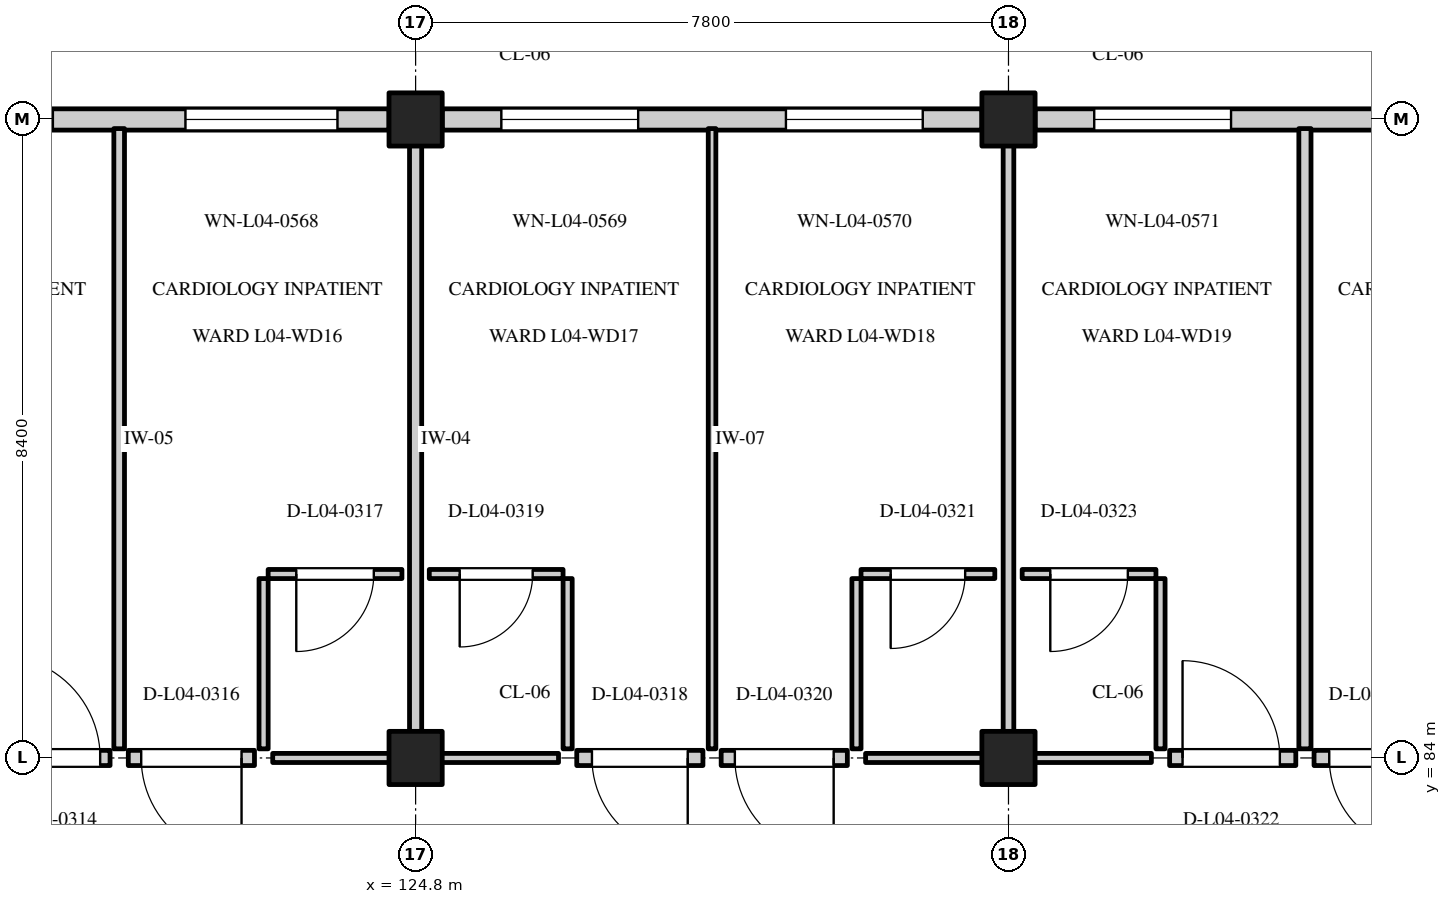
"""IFC4 building model, lengths in metres.
Left out: names, types, materials, properties, quantities, classifications, styles, units other than length and angle.
Written with IfcOpenShell. Run it as: python <this file> out.ifc"""

import sys

from ifc_helpers import new_model, si_unit, direction, frame, frame_2d, origin, origin_2d, place, context, subcontext, project, spatial, rectangle, extrude, element, fill, save


model = new_model("IFC4")
c1 = context("Model", 3, precision=1e-05, world=origin(), true_north=direction((0.0, 1.0)))
c2 = subcontext(c1, "Body", "Model", "MODEL_VIEW")
j1 = project(units=[si_unit("LENGTHUNIT", "METRE"), si_unit("PLANEANGLEUNIT", "RADIAN")], contexts=[c1])
p1 = place(None, origin())
s1 = spatial("IfcSite", under=j1, at=p1, CompositionType="ELEMENT")
p2 = place(p1, origin())
s2 = spatial("IfcBuilding", under=s1, at=p2, CompositionType="ELEMENT")
p3 = place(p2, frame((0.0, 0.0, 18.0)))
s3 = spatial("IfcBuildingStorey", under=s2, at=p3, CompositionType="ELEMENT", Elevation=18.0)
for number, where, z_axis, x_axis in (
    (1, (124.8, 84.0, 0.0), (0.0, 0.0, 1.0), (1.0, 0.0, 0.0)),
    (2, (124.8, 92.4, 0.0), (0.0, 0.0, 1.0), (1.0, 0.0, 0.0)),
    (3, (132.6, 84.0, 0.0), (0.0, 0.0, 1.0), (1.0, 0.0, 0.0)),
    (4, (132.6, 92.4, 0.0), (0.0, 0.0, 1.0), (1.0, 0.0, 0.0)),
):
    element("IfcColumn", number, at=place(p3, frame(where, z_axis=z_axis, x_axis=x_axis)), inside=s3, PredefinedType="COLUMN", context=c2, shape_type="SweptSolid", body=[
        extrude(rectangle(XDim=0.7, YDim=0.7, at=origin_2d()), origin(), (0.0, 0.0, 1.0), 4.2),
    ])
p4 = place(p3, frame((117.35, 92.4, 0.0), z_axis=(0.0, 0.0, 1.0), x_axis=(1.0, 0.0, 0.0)))
e5 = element("IfcWall", 5, at=p4, inside=s3, PredefinedType="STANDARD", context=c2, shape_type="SweptSolid", body=[
    extrude(rectangle(XDim=7.1, YDim=0.28, at=frame_2d((3.55, 0.0))), origin(), (0.0, 0.0, 1.0), 3.335),
])
p5 = place(p4, frame((0.678, 0.0, 0.8)))
e6 = element("IfcOpeningElement", 6, at=p5, cuts=e5, PredefinedType="OPENING", context=c2, shape_type="SweptSolid", body=[
    extrude(rectangle(XDim=2.0, YDim=1.45, at=frame_2d((1.0, 0.725))), frame((0.0, 0.152, 0.0), z_axis=(0.0, -1.0, 0.0), x_axis=(1.0, 0.0, 0.0)), (0.0, 0.0, 1.0), 0.304),
])
p6 = place(p4, frame((4.422, 0.0, 0.8)))
e7 = element("IfcOpeningElement", 7, at=p6, cuts=e5, PredefinedType="OPENING", context=c2, shape_type="SweptSolid", body=[
    extrude(rectangle(XDim=2.0, YDim=1.45, at=frame_2d((1.0, 0.725))), frame((0.0, 0.152, 0.0), z_axis=(0.0, -1.0, 0.0), x_axis=(1.0, 0.0, 0.0)), (0.0, 0.0, 1.0), 0.304),
])
p7 = place(p3, frame((125.15, 92.4, 0.0), z_axis=(0.0, 0.0, 1.0), x_axis=(1.0, 0.0, 0.0)))
e8 = element("IfcWall", 8, at=p7, inside=s3, PredefinedType="STANDARD", context=c2, shape_type="SweptSolid", body=[
    extrude(rectangle(XDim=7.1, YDim=0.28, at=frame_2d((3.55, 0.0))), origin(), (0.0, 0.0, 1.0), 3.335),
])
p8 = place(p7, frame((0.778, 0.0, 0.8)))
e9 = element("IfcOpeningElement", 9, at=p8, cuts=e8, PredefinedType="OPENING", context=c2, shape_type="SweptSolid", body=[
    extrude(rectangle(XDim=1.8, YDim=1.75, at=frame_2d((0.9, 0.875))), frame((0.0, 0.152, 0.0), z_axis=(0.0, -1.0, 0.0), x_axis=(1.0, 0.0, 0.0)), (0.0, 0.0, 1.0), 0.304),
])
p9 = place(p7, frame((4.522, 0.0, 0.8)))
e10 = element("IfcOpeningElement", 10, at=p9, cuts=e8, PredefinedType="OPENING", context=c2, shape_type="SweptSolid", body=[
    extrude(rectangle(XDim=1.8, YDim=1.75, at=frame_2d((0.9, 0.875))), frame((0.0, 0.152, 0.0), z_axis=(0.0, -1.0, 0.0), x_axis=(1.0, 0.0, 0.0)), (0.0, 0.0, 1.0), 0.304),
])
p10 = place(p3, frame((132.95, 92.4, 0.0), z_axis=(0.0, 0.0, 1.0), x_axis=(1.0, 0.0, 0.0)))
e11 = element("IfcWall", 11, at=p10, inside=s3, PredefinedType="STANDARD", context=c2, shape_type="SweptSolid", body=[
    extrude(rectangle(XDim=7.1, YDim=0.28, at=frame_2d((3.55, 0.0))), origin(), (0.0, 0.0, 1.0), 3.335),
])
p11 = place(p10, frame((0.778, 0.0, 0.8)))
e12 = element("IfcOpeningElement", 12, at=p11, cuts=e11, PredefinedType="OPENING", context=c2, shape_type="SweptSolid", body=[
    extrude(rectangle(XDim=1.8, YDim=1.65, at=frame_2d((0.9, 0.825))), frame((0.0, 0.152, 0.0), z_axis=(0.0, -1.0, 0.0), x_axis=(1.0, 0.0, 0.0)), (0.0, 0.0, 1.0), 0.304),
])
p12 = place(p10, frame((4.522, 0.0, 0.8)))
e13 = element("IfcOpeningElement", 13, at=p12, cuts=e11, PredefinedType="OPENING", context=c2, shape_type="SweptSolid", body=[
    extrude(rectangle(XDim=1.8, YDim=1.65, at=frame_2d((0.9, 0.825))), frame((0.0, 0.152, 0.0), z_axis=(0.0, -1.0, 0.0), x_axis=(1.0, 0.0, 0.0)), (0.0, 0.0, 1.0), 0.304),
])
p13 = place(p3, frame((120.9, 84.12, 0.0), z_axis=(0.0, 0.0, 1.0), x_axis=(0.0, 1.0, 0.0)))
e14 = element("IfcWall", 14, at=p13, inside=s3, PredefinedType="PARTITIONING", context=c2, shape_type="SweptSolid", body=[
    extrude(rectangle(XDim=8.16, YDim=0.14, at=frame_2d((4.08, 0.0))), origin(), (0.0, 0.0, 1.0), 3.865),
])
p14 = place(p3, frame((119.12, 84.0, 0.0), z_axis=(0.0, 0.0, 1.0), x_axis=(1.0, 0.0, 0.0)))
e15 = element("IfcWall", 15, at=p14, inside=s3, PredefinedType="STANDARD", context=c2, shape_type="SweptSolid", body=[
    extrude(rectangle(XDim=1.66, YDim=0.2, at=frame_2d((0.83, 0.0))), origin(), (0.0, 0.0, 1.0), 3.235),
])
p15 = place(p14, frame((0.18, 0.0, 0.0)))
e16 = element("IfcOpeningElement", 16, at=p15, cuts=e15, PredefinedType="OPENING", context=c2, shape_type="SweptSolid", body=[
    extrude(rectangle(XDim=1.35, YDim=2.15, at=frame_2d((0.675, 1.075))), frame((0.0, 0.112, 0.0), z_axis=(0.0, -1.0, 0.0), x_axis=(1.0, 0.0, 0.0)), (0.0, 0.0, 1.0), 0.224),
])
p16 = place(p3, frame((124.8, 84.12, 0.0), z_axis=(0.0, 0.0, 1.0), x_axis=(0.0, 1.0, 0.0)))
e17 = element("IfcWall", 17, at=p16, inside=s3, PredefinedType="PARTITIONING", context=c2, shape_type="SweptSolid", body=[
    extrude(rectangle(XDim=8.16, YDim=0.16, at=frame_2d((4.08, 0.0))), origin(), (0.0, 0.0, 1.0), 3.865),
])
p17 = place(p3, frame((121.02, 84.0, 0.0), z_axis=(0.0, 0.0, 1.0), x_axis=(1.0, 0.0, 0.0)))
e18 = element("IfcWall", 18, at=p17, inside=s3, PredefinedType="STANDARD", context=c2, shape_type="SweptSolid", body=[
    extrude(rectangle(XDim=1.66, YDim=0.2, at=frame_2d((0.83, 0.0))), origin(), (0.0, 0.0, 1.0), 3.235),
])
p18 = place(p17, frame((0.17, 0.0, 0.0)))
e19 = element("IfcOpeningElement", 19, at=p18, cuts=e18, PredefinedType="OPENING", context=c2, shape_type="SweptSolid", body=[
    extrude(rectangle(XDim=1.32, YDim=2.2, at=frame_2d((0.66, 1.1))), frame((0.0, 0.112, 0.0), z_axis=(0.0, -1.0, 0.0), x_axis=(1.0, 0.0, 0.0)), (0.0, 0.0, 1.0), 0.224),
])
p19 = place(p3, frame((122.92, 84.0, 0.0), z_axis=(0.0, 0.0, 1.0), x_axis=(1.0, 0.0, 0.0)))
e20 = element("IfcWall", 20, at=p19, inside=s3, PredefinedType="PARTITIONING", context=c2, shape_type="SweptSolid", body=[
    extrude(rectangle(XDim=1.76, YDim=0.12, at=frame_2d((0.88, 0.0))), origin(), (0.0, 0.0, 1.0), 3.235),
])
p20 = place(p3, frame((122.8, 84.12, 0.0), z_axis=(0.0, 0.0, 1.0), x_axis=(0.0, 1.0, 0.0)))
e21 = element("IfcWall", 21, at=p20, inside=s3, PredefinedType="PARTITIONING", context=c2, shape_type="SweptSolid", body=[
    extrude(rectangle(XDim=2.24, YDim=0.12, at=frame_2d((1.12, 0.0))), origin(), (0.0, 0.0, 1.0), 3.865),
])
p21 = place(p3, frame((122.86, 86.42, 0.0), z_axis=(0.0, 0.0, 1.0), x_axis=(1.0, 0.0, 0.0)))
e22 = element("IfcWall", 22, at=p21, inside=s3, PredefinedType="PARTITIONING", context=c2, shape_type="SweptSolid", body=[
    extrude(rectangle(XDim=1.76, YDim=0.12, at=frame_2d((0.88, 0.0))), origin(), (0.0, 0.0, 1.0), 3.865),
])
p22 = place(p21, frame((0.37, 0.0, 0.0)))
e23 = element("IfcOpeningElement", 23, at=p22, cuts=e22, PredefinedType="OPENING", context=c2, shape_type="SweptSolid", body=[
    extrude(rectangle(XDim=1.02, YDim=2.15, at=frame_2d((0.51, 1.075))), frame((0.0, 0.072, 0.0), z_axis=(0.0, -1.0, 0.0), x_axis=(1.0, 0.0, 0.0)), (0.0, 0.0, 1.0), 0.144),
])
p23 = place(p3, frame((128.7, 84.12, 0.0), z_axis=(0.0, 0.0, 1.0), x_axis=(0.0, 1.0, 0.0)))
e24 = element("IfcWall", 24, at=p23, inside=s3, PredefinedType="PARTITIONING", context=c2, shape_type="SweptSolid", body=[
    extrude(rectangle(XDim=8.16, YDim=0.1, at=frame_2d((4.08, 0.0))), origin(), (0.0, 0.0, 1.0), 3.865),
])
p24 = place(p3, frame((126.92, 84.0, 0.0), z_axis=(0.0, 0.0, 1.0), x_axis=(1.0, 0.0, 0.0)))
e25 = element("IfcWall", 25, at=p24, inside=s3, PredefinedType="STANDARD", context=c2, shape_type="SweptSolid", body=[
    extrude(rectangle(XDim=1.66, YDim=0.2, at=frame_2d((0.83, 0.0))), origin(), (0.0, 0.0, 1.0), 3.235),
])
p25 = place(p24, frame((0.2, 0.0, 0.0)))
e26 = element("IfcOpeningElement", 26, at=p25, cuts=e25, PredefinedType="OPENING", context=c2, shape_type="SweptSolid", body=[
    extrude(rectangle(XDim=1.26, YDim=2.1, at=frame_2d((0.63, 1.05))), frame((0.0, 0.112, 0.0), z_axis=(0.0, -1.0, 0.0), x_axis=(1.0, 0.0, 0.0)), (0.0, 0.0, 1.0), 0.224),
])
p26 = place(p3, frame((124.92, 84.0, 0.0), z_axis=(0.0, 0.0, 1.0), x_axis=(1.0, 0.0, 0.0)))
e27 = element("IfcWall", 27, at=p26, inside=s3, PredefinedType="PARTITIONING", context=c2, shape_type="SweptSolid", body=[
    extrude(rectangle(XDim=1.76, YDim=0.12, at=frame_2d((0.88, 0.0))), origin(), (0.0, 0.0, 1.0), 3.235),
])
p27 = place(p3, frame((126.8, 84.12, 0.0), z_axis=(0.0, 0.0, 1.0), x_axis=(0.0, 1.0, 0.0)))
e28 = element("IfcWall", 28, at=p27, inside=s3, PredefinedType="PARTITIONING", context=c2, shape_type="SweptSolid", body=[
    extrude(rectangle(XDim=2.24, YDim=0.12, at=frame_2d((1.12, 0.0))), origin(), (0.0, 0.0, 1.0), 3.865),
])
p28 = place(p3, frame((124.98, 86.42, 0.0), z_axis=(0.0, 0.0, 1.0), x_axis=(1.0, 0.0, 0.0)))
e29 = element("IfcWall", 29, at=p28, inside=s3, PredefinedType="PARTITIONING", context=c2, shape_type="SweptSolid", body=[
    extrude(rectangle(XDim=1.76, YDim=0.12, at=frame_2d((0.88, 0.0))), origin(), (0.0, 0.0, 1.0), 3.865),
])
p29 = place(p28, frame((0.4, 0.0, 0.0)))
e30 = element("IfcOpeningElement", 30, at=p29, cuts=e29, PredefinedType="OPENING", context=c2, shape_type="SweptSolid", body=[
    extrude(rectangle(XDim=0.96, YDim=2.12, at=frame_2d((0.48, 1.06))), frame((0.0, 0.072, 0.0), z_axis=(0.0, -1.0, 0.0), x_axis=(1.0, 0.0, 0.0)), (0.0, 0.0, 1.0), 0.144),
])
p30 = place(p3, frame((132.6, 84.12, 0.0), z_axis=(0.0, 0.0, 1.0), x_axis=(0.0, 1.0, 0.0)))
e31 = element("IfcWall", 31, at=p30, inside=s3, PredefinedType="PARTITIONING", context=c2, shape_type="SweptSolid", body=[
    extrude(rectangle(XDim=8.16, YDim=0.14, at=frame_2d((4.08, 0.0))), origin(), (0.0, 0.0, 1.0), 3.235),
])
p31 = place(p3, frame((128.82, 84.0, 0.0), z_axis=(0.0, 0.0, 1.0), x_axis=(1.0, 0.0, 0.0)))
e32 = element("IfcWall", 32, at=p31, inside=s3, PredefinedType="STANDARD", context=c2, shape_type="SweptSolid", body=[
    extrude(rectangle(XDim=1.66, YDim=0.2, at=frame_2d((0.83, 0.0))), origin(), (0.0, 0.0, 1.0), 3.235),
])
p32 = place(p31, frame((0.18, 0.0, 0.0)))
e33 = element("IfcOpeningElement", 33, at=p32, cuts=e32, PredefinedType="OPENING", context=c2, shape_type="SweptSolid", body=[
    extrude(rectangle(XDim=1.3, YDim=2.15, at=frame_2d((0.65, 1.075))), frame((0.0, 0.112, 0.0), z_axis=(0.0, -1.0, 0.0), x_axis=(1.0, 0.0, 0.0)), (0.0, 0.0, 1.0), 0.224),
])
p33 = place(p3, frame((130.72, 84.0, 0.0), z_axis=(0.0, 0.0, 1.0), x_axis=(1.0, 0.0, 0.0)))
e34 = element("IfcWall", 34, at=p33, inside=s3, PredefinedType="PARTITIONING", context=c2, shape_type="SweptSolid", body=[
    extrude(rectangle(XDim=1.76, YDim=0.12, at=frame_2d((0.88, 0.0))), origin(), (0.0, 0.0, 1.0), 3.235),
])
p34 = place(p3, frame((130.6, 84.12, 0.0), z_axis=(0.0, 0.0, 1.0), x_axis=(0.0, 1.0, 0.0)))
e35 = element("IfcWall", 35, at=p34, inside=s3, PredefinedType="PARTITIONING", context=c2, shape_type="SweptSolid", body=[
    extrude(rectangle(XDim=2.24, YDim=0.12, at=frame_2d((1.12, 0.0))), origin(), (0.0, 0.0, 1.0), 3.865),
])
p35 = place(p3, frame((130.66, 86.42, 0.0), z_axis=(0.0, 0.0, 1.0), x_axis=(1.0, 0.0, 0.0)))
e36 = element("IfcWall", 36, at=p35, inside=s3, PredefinedType="PARTITIONING", context=c2, shape_type="SweptSolid", body=[
    extrude(rectangle(XDim=1.76, YDim=0.12, at=frame_2d((0.88, 0.0))), origin(), (0.0, 0.0, 1.0), 3.865),
])
p36 = place(p35, frame((0.39, 0.0, 0.0)))
e37 = element("IfcOpeningElement", 37, at=p36, cuts=e36, PredefinedType="OPENING", context=c2, shape_type="SweptSolid", body=[
    extrude(rectangle(XDim=0.98, YDim=2.1, at=frame_2d((0.49, 1.05))), frame((0.0, 0.072, 0.0), z_axis=(0.0, -1.0, 0.0), x_axis=(1.0, 0.0, 0.0)), (0.0, 0.0, 1.0), 0.144),
])
p37 = place(p3, frame((136.5, 84.12, 0.0), z_axis=(0.0, 0.0, 1.0), x_axis=(0.0, 1.0, 0.0)))
e38 = element("IfcWall", 38, at=p37, inside=s3, PredefinedType="PARTITIONING", context=c2, shape_type="SweptSolid", body=[
    extrude(rectangle(XDim=8.16, YDim=0.16, at=frame_2d((4.08, 0.0))), origin(), (0.0, 0.0, 1.0), 3.865),
])
p38 = place(p3, frame((134.72, 84.0, 0.0), z_axis=(0.0, 0.0, 1.0), x_axis=(1.0, 0.0, 0.0)))
e39 = element("IfcWall", 39, at=p38, inside=s3, PredefinedType="STANDARD", context=c2, shape_type="SweptSolid", body=[
    extrude(rectangle(XDim=1.66, YDim=0.2, at=frame_2d((0.83, 0.0))), origin(), (0.0, 0.0, 1.0), 3.235),
])
p39 = place(p38, frame((0.17, 0.0, 0.0)))
e40 = element("IfcOpeningElement", 40, at=p39, cuts=e39, PredefinedType="OPENING", context=c2, shape_type="SweptSolid", body=[
    extrude(rectangle(XDim=1.28, YDim=2.15, at=frame_2d((0.64, 1.075))), frame((0.0, 0.112, 0.0), z_axis=(0.0, -1.0, 0.0), x_axis=(1.0, 0.0, 0.0)), (0.0, 0.0, 1.0), 0.224),
])
p40 = place(p3, frame((132.72, 84.0, 0.0), z_axis=(0.0, 0.0, 1.0), x_axis=(1.0, 0.0, 0.0)))
e41 = element("IfcWall", 41, at=p40, inside=s3, PredefinedType="PARTITIONING", context=c2, shape_type="SweptSolid", body=[
    extrude(rectangle(XDim=1.76, YDim=0.12, at=frame_2d((0.88, 0.0))), origin(), (0.0, 0.0, 1.0), 3.235),
])
p41 = place(p3, frame((134.6, 84.12, 0.0), z_axis=(0.0, 0.0, 1.0), x_axis=(0.0, 1.0, 0.0)))
e42 = element("IfcWall", 42, at=p41, inside=s3, PredefinedType="PARTITIONING", context=c2, shape_type="SweptSolid", body=[
    extrude(rectangle(XDim=2.24, YDim=0.12, at=frame_2d((1.12, 0.0))), origin(), (0.0, 0.0, 1.0), 3.865),
])
p42 = place(p3, frame((132.78, 86.42, 0.0), z_axis=(0.0, 0.0, 1.0), x_axis=(1.0, 0.0, 0.0)))
e43 = element("IfcWall", 43, at=p42, inside=s3, PredefinedType="PARTITIONING", context=c2, shape_type="SweptSolid", body=[
    extrude(rectangle(XDim=1.76, YDim=0.12, at=frame_2d((0.88, 0.0))), origin(), (0.0, 0.0, 1.0), 3.865),
])
p43 = place(p42, frame((0.37, 0.0, 0.0)))
e44 = element("IfcOpeningElement", 44, at=p43, cuts=e43, PredefinedType="OPENING", context=c2, shape_type="SweptSolid", body=[
    extrude(rectangle(XDim=1.02, YDim=2.15, at=frame_2d((0.51, 1.075))), frame((0.0, 0.072, 0.0), z_axis=(0.0, -1.0, 0.0), x_axis=(1.0, 0.0, 0.0)), (0.0, 0.0, 1.0), 0.144),
])
p44 = place(p3, frame((136.62, 84.0, 0.0), z_axis=(0.0, 0.0, 1.0), x_axis=(1.0, 0.0, 0.0)))
e45 = element("IfcWall", 45, at=p44, inside=s3, PredefinedType="STANDARD", context=c2, shape_type="SweptSolid", body=[
    extrude(rectangle(XDim=1.66, YDim=0.2, at=frame_2d((0.83, 0.0))), origin(), (0.0, 0.0, 1.0), 3.235),
])
p45 = place(p44, frame((0.2, 0.0, 0.0)))
e46 = element("IfcOpeningElement", 46, at=p45, cuts=e45, PredefinedType="OPENING", context=c2, shape_type="SweptSolid", body=[
    extrude(rectangle(XDim=1.26, YDim=2.1, at=frame_2d((0.63, 1.05))), frame((0.0, 0.112, 0.0), z_axis=(0.0, -1.0, 0.0), x_axis=(1.0, 0.0, 0.0)), (0.0, 0.0, 1.0), 0.224),
])
p46 = place(p5, origin())
e47 = element("IfcWindow", 47, at=p46, inside=s3, PartitioningType="DOUBLE_PANEL_VERTICAL", PredefinedType="WINDOW", context=c2, shape_type="SweptSolid", body=[
    extrude(rectangle(XDim=2.0, YDim=1.45, at=frame_2d((1.0, 0.725))), frame((0.0, 0.03, 0.0), z_axis=(0.0, -1.0, 0.0), x_axis=(1.0, 0.0, 0.0)), (0.0, 0.0, 1.0), 0.06),
])
fill(e6, e47)
p47 = place(p6, origin())
e48 = element("IfcWindow", 48, at=p47, inside=s3, PartitioningType="DOUBLE_PANEL_VERTICAL", PredefinedType="WINDOW", context=c2, shape_type="SweptSolid", body=[
    extrude(rectangle(XDim=2.0, YDim=1.45, at=frame_2d((1.0, 0.725))), frame((0.0, 0.03, 0.0), z_axis=(0.0, -1.0, 0.0), x_axis=(1.0, 0.0, 0.0)), (0.0, 0.0, 1.0), 0.06),
])
fill(e7, e48)
p48 = place(p8, origin())
e49 = element("IfcWindow", 49, at=p48, inside=s3, PartitioningType="DOUBLE_PANEL_VERTICAL", PredefinedType="WINDOW", context=c2, shape_type="SweptSolid", body=[
    extrude(rectangle(XDim=1.8, YDim=1.75, at=frame_2d((0.9, 0.875))), frame((0.0, 0.03, 0.0), z_axis=(0.0, -1.0, 0.0), x_axis=(1.0, 0.0, 0.0)), (0.0, 0.0, 1.0), 0.06),
])
fill(e9, e49)
p49 = place(p9, origin())
e50 = element("IfcWindow", 50, at=p49, inside=s3, PartitioningType="DOUBLE_PANEL_VERTICAL", PredefinedType="WINDOW", context=c2, shape_type="SweptSolid", body=[
    extrude(rectangle(XDim=1.8, YDim=1.75, at=frame_2d((0.9, 0.875))), frame((0.0, 0.03, 0.0), z_axis=(0.0, -1.0, 0.0), x_axis=(1.0, 0.0, 0.0)), (0.0, 0.0, 1.0), 0.06),
])
fill(e10, e50)
p50 = place(p11, origin())
e51 = element("IfcWindow", 51, at=p50, inside=s3, PartitioningType="DOUBLE_PANEL_VERTICAL", PredefinedType="WINDOW", context=c2, shape_type="SweptSolid", body=[
    extrude(rectangle(XDim=1.8, YDim=1.65, at=frame_2d((0.9, 0.825))), frame((0.0, 0.03, 0.0), z_axis=(0.0, -1.0, 0.0), x_axis=(1.0, 0.0, 0.0)), (0.0, 0.0, 1.0), 0.06),
])
fill(e12, e51)
p51 = place(p15, origin())
e52 = element("IfcDoor", 52, at=p51, inside=s3, OperationType="SINGLE_SWING_LEFT", PredefinedType="DOOR", context=c2, shape_type="SweptSolid", body=[
    extrude(rectangle(XDim=1.35, YDim=2.15, at=frame_2d((0.675, 1.075))), frame((0.0, 0.025, 0.0), z_axis=(0.0, -1.0, 0.0), x_axis=(1.0, 0.0, 0.0)), (0.0, 0.0, 1.0), 0.05),
])
fill(e16, e52)
p52 = place(p18, origin())
e53 = element("IfcDoor", 53, at=p52, inside=s3, OperationType="SINGLE_SWING_RIGHT", PredefinedType="DOOR", context=c2, shape_type="SweptSolid", body=[
    extrude(rectangle(XDim=1.32, YDim=2.2, at=frame_2d((0.66, 1.1))), frame((0.0, 0.025, 0.0), z_axis=(0.0, -1.0, 0.0), x_axis=(1.0, 0.0, 0.0)), (0.0, 0.0, 1.0), 0.05),
])
fill(e19, e53)
p53 = place(p22, frame((1.02, 0.0, 0.0), z_axis=(0.0, 0.0, 1.0), x_axis=(-1.0, 0.0, 0.0)))
e54 = element("IfcDoor", 54, at=p53, inside=s3, OperationType="SINGLE_SWING_RIGHT", PredefinedType="DOOR", context=c2, shape_type="SweptSolid", body=[
    extrude(rectangle(XDim=1.02, YDim=2.15, at=frame_2d((0.51, 1.075))), frame((0.0, 0.025, 0.0), z_axis=(0.0, -1.0, 0.0), x_axis=(1.0, 0.0, 0.0)), (0.0, 0.0, 1.0), 0.05),
])
fill(e23, e54)
p54 = place(p25, origin())
e55 = element("IfcDoor", 55, at=p54, inside=s3, OperationType="SINGLE_SWING_RIGHT", PredefinedType="DOOR", context=c2, shape_type="SweptSolid", body=[
    extrude(rectangle(XDim=1.26, YDim=2.1, at=frame_2d((0.63, 1.05))), frame((0.0, 0.025, 0.0), z_axis=(0.0, -1.0, 0.0), x_axis=(1.0, 0.0, 0.0)), (0.0, 0.0, 1.0), 0.05),
])
fill(e26, e55)
p55 = place(p29, frame((0.96, 0.0, 0.0), z_axis=(0.0, 0.0, 1.0), x_axis=(-1.0, 0.0, 0.0)))
e56 = element("IfcDoor", 56, at=p55, inside=s3, OperationType="SINGLE_SWING_RIGHT", PredefinedType="DOOR", context=c2, shape_type="SweptSolid", body=[
    extrude(rectangle(XDim=0.96, YDim=2.12, at=frame_2d((0.48, 1.06))), frame((0.0, 0.025, 0.0), z_axis=(0.0, -1.0, 0.0), x_axis=(1.0, 0.0, 0.0)), (0.0, 0.0, 1.0), 0.05),
])
fill(e30, e56)
p56 = place(p32, origin())
e57 = element("IfcDoor", 57, at=p56, inside=s3, OperationType="SINGLE_SWING_RIGHT", PredefinedType="DOOR", context=c2, shape_type="SweptSolid", body=[
    extrude(rectangle(XDim=1.3, YDim=2.15, at=frame_2d((0.65, 1.075))), frame((0.0, 0.025, 0.0), z_axis=(0.0, -1.0, 0.0), x_axis=(1.0, 0.0, 0.0)), (0.0, 0.0, 1.0), 0.05),
])
fill(e33, e57)
p57 = place(p36, frame((0.98, 0.0, 0.0), z_axis=(0.0, 0.0, 1.0), x_axis=(-1.0, 0.0, 0.0)))
e58 = element("IfcDoor", 58, at=p57, inside=s3, OperationType="SINGLE_SWING_RIGHT", PredefinedType="DOOR", context=c2, shape_type="SweptSolid", body=[
    extrude(rectangle(XDim=0.98, YDim=2.1, at=frame_2d((0.49, 1.05))), frame((0.0, 0.025, 0.0), z_axis=(0.0, -1.0, 0.0), x_axis=(1.0, 0.0, 0.0)), (0.0, 0.0, 1.0), 0.05),
])
fill(e37, e58)
p58 = place(p39, origin())
e59 = element("IfcDoor", 59, at=p58, inside=s3, OperationType="SINGLE_SWING_LEFT", PredefinedType="DOOR", context=c2, shape_type="SweptSolid", body=[
    extrude(rectangle(XDim=1.28, YDim=2.15, at=frame_2d((0.64, 1.075))), frame((0.0, 0.025, 0.0), z_axis=(0.0, -1.0, 0.0), x_axis=(1.0, 0.0, 0.0)), (0.0, 0.0, 1.0), 0.05),
])
fill(e40, e59)
p59 = place(p43, frame((1.02, 0.0, 0.0), z_axis=(0.0, 0.0, 1.0), x_axis=(-1.0, 0.0, 0.0)))
e60 = element("IfcDoor", 60, at=p59, inside=s3, OperationType="SINGLE_SWING_RIGHT", PredefinedType="DOOR", context=c2, shape_type="SweptSolid", body=[
    extrude(rectangle(XDim=1.02, YDim=2.15, at=frame_2d((0.51, 1.075))), frame((0.0, 0.025, 0.0), z_axis=(0.0, -1.0, 0.0), x_axis=(1.0, 0.0, 0.0)), (0.0, 0.0, 1.0), 0.05),
])
fill(e44, e60)
p60 = place(p45, origin())
e61 = element("IfcDoor", 61, at=p60, inside=s3, OperationType="SINGLE_SWING_RIGHT", PredefinedType="DOOR", context=c2, shape_type="SweptSolid", body=[
    extrude(rectangle(XDim=1.26, YDim=2.1, at=frame_2d((0.63, 1.05))), frame((0.0, 0.025, 0.0), z_axis=(0.0, -1.0, 0.0), x_axis=(1.0, 0.0, 0.0)), (0.0, 0.0, 1.0), 0.05),
])
fill(e46, e61)
save(model, sys.argv[1])
